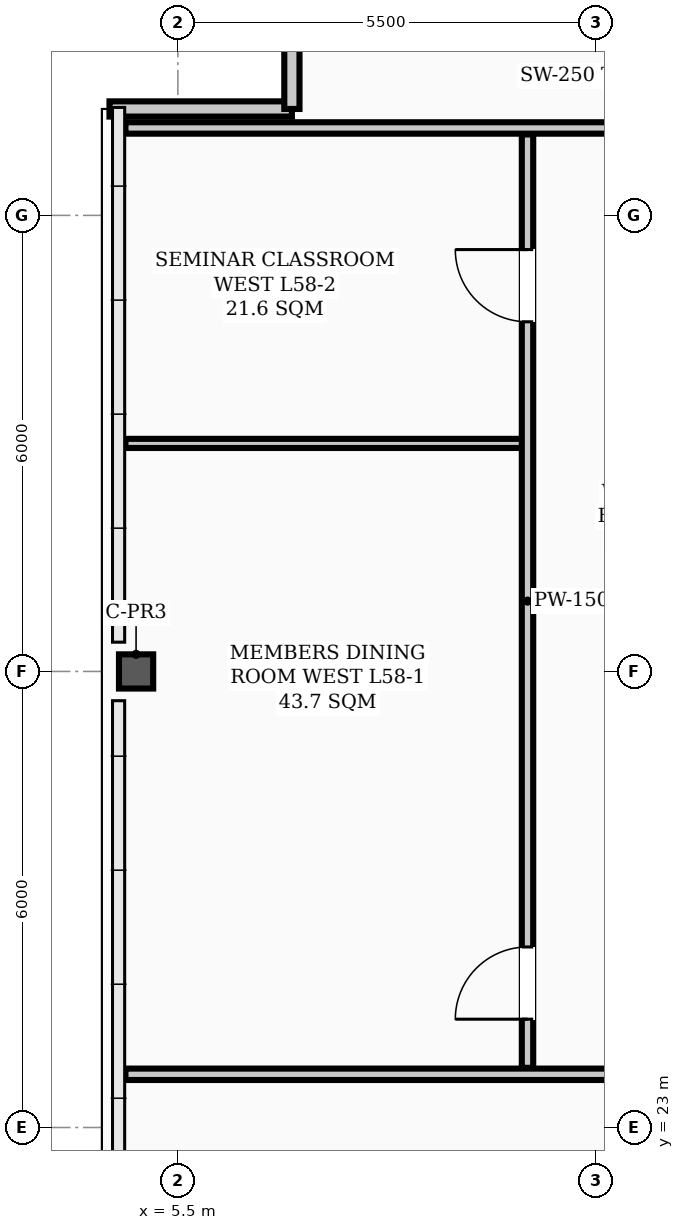
"""IFC4 building model, lengths in metres.
Left out: names, types, materials, properties, quantities, classifications, styles, units other than length and angle.
Written with IfcOpenShell. Run it as: python <this file> out.ifc"""

import sys

from ifc_helpers import new_model, si_unit, direction, frame, frame_2d, origin, origin_2d, place, context, subcontext, project, spatial, rectangle, hollow_rectangle, extrude, element, fill, save


model = new_model("IFC4")
c1 = context("Model", 3, precision=1e-05, world=origin(), true_north=direction((0.0, 1.0)))
c2 = subcontext(c1, "Body", "Model", "MODEL_VIEW")
j1 = project(units=[si_unit("LENGTHUNIT", "METRE"), si_unit("PLANEANGLEUNIT", "RADIAN")], contexts=[c1])
p1 = place(None, origin())
s1 = spatial("IfcSite", under=j1, at=p1, CompositionType="ELEMENT")
p2 = place(p1, origin())
s2 = spatial("IfcBuilding", under=s1, at=p2, CompositionType="ELEMENT")
p3 = place(p2, frame((0.0, 0.0, 234.5)))
s3 = spatial("IfcBuildingStorey", under=s2, at=p3, CompositionType="ELEMENT", Elevation=234.5)
p4 = place(p3, frame((4.95, 29.0, 0.0), z_axis=(0.0, 0.0, 1.0), x_axis=(1.0, 0.0, 0.0)))
e1 = element("IfcColumn", 1, at=p4, inside=s3, PredefinedType="COLUMN", context=c2, shape_type="SweptSolid", body=[
    extrude(hollow_rectangle(XDim=0.45, YDim=0.45, WallThickness=0.022, InnerFilletRadius=0.022, OuterFilletRadius=0.044, at=origin_2d()), origin(), (0.0, 0.0, 1.0), 3.9),
])
p5 = place(p3, frame((4.6, 36.4, 0.0), z_axis=(0.0, 0.0, 1.0), x_axis=(1.0, 0.0, 0.0)))
e2 = element("IfcWall", 2, at=p5, inside=s3, PredefinedType="PARAPET", context=c2, shape_type="SweptSolid", body=[
    extrude(rectangle(XDim=2.4, YDim=0.2, at=frame_2d((1.2, 0.0))), origin(), (0.0, 0.0, 1.0), 1.2),
])
p6 = place(p3, frame((7.0, 36.4, 0.0), z_axis=(0.0, 0.0, 1.0), x_axis=(0.0, 1.0, 0.0)))
e3 = element("IfcWall", 3, at=p6, inside=s3, PredefinedType="PARAPET", context=c2, shape_type="SweptSolid", body=[
    extrude(rectangle(XDim=2.4, YDim=0.2, at=frame_2d((1.2, 0.0))), origin(), (0.0, 0.0, 1.0), 1.2),
])
p7 = place(p3, frame((4.81, 23.7, 0.0), z_axis=(0.0, 0.0, 1.0), x_axis=(1.0, 0.0, 0.0)))
e4 = element("IfcWall", 4, at=p7, inside=s3, PredefinedType="PARTITIONING", context=c2, shape_type="SweptSolid", body=[
    extrude(rectangle(XDim=40.88, YDim=0.15, at=frame_2d((20.44, 0.0))), origin(), (0.0, 0.0, 1.0), 3.2),
])
p8 = place(p7, frame((6.665, 0.0, 0.0)))
e5 = element("IfcOpeningElement", 5, at=p8, cuts=e4, PredefinedType="OPENING", context=c2, shape_type="SweptSolid", body=[
    extrude(rectangle(XDim=0.95, YDim=2.08, at=frame_2d((0.475, 1.04))), frame((0.0, 0.085, 0.0), z_axis=(0.0, -1.0, 0.0), x_axis=(1.0, 0.0, 0.0)), (0.0, 0.0, 1.0), 0.17),
])
p9 = place(p7, frame((14.515, 0.0, 0.0)))
e6 = element("IfcOpeningElement", 6, at=p9, cuts=e4, PredefinedType="OPENING", context=c2, shape_type="SweptSolid", body=[
    extrude(rectangle(XDim=0.95, YDim=2.08, at=frame_2d((0.475, 1.04))), frame((0.0, 0.085, 0.0), z_axis=(0.0, -1.0, 0.0), x_axis=(1.0, 0.0, 0.0)), (0.0, 0.0, 1.0), 0.17),
])
p10 = place(p7, frame((23.115, 0.0, 0.0)))
e7 = element("IfcOpeningElement", 7, at=p10, cuts=e4, PredefinedType="OPENING", context=c2, shape_type="SweptSolid", body=[
    extrude(rectangle(XDim=0.95, YDim=2.08, at=frame_2d((0.475, 1.04))), frame((0.0, 0.085, 0.0), z_axis=(0.0, -1.0, 0.0), x_axis=(1.0, 0.0, 0.0)), (0.0, 0.0, 1.0), 0.17),
])
p11 = place(p7, frame((28.565, 0.0, 0.0)))
e8 = element("IfcOpeningElement", 8, at=p11, cuts=e4, PredefinedType="OPENING", context=c2, shape_type="SweptSolid", body=[
    extrude(rectangle(XDim=0.95, YDim=2.08, at=frame_2d((0.475, 1.04))), frame((0.0, 0.085, 0.0), z_axis=(0.0, -1.0, 0.0), x_axis=(1.0, 0.0, 0.0)), (0.0, 0.0, 1.0), 0.17),
])
p12 = place(p7, frame((36.965, 0.0, 0.0)))
e9 = element("IfcOpeningElement", 9, at=p12, cuts=e4, PredefinedType="OPENING", context=c2, shape_type="SweptSolid", body=[
    extrude(rectangle(XDim=0.95, YDim=2.08, at=frame_2d((0.475, 1.04))), frame((0.0, 0.085, 0.0), z_axis=(0.0, -1.0, 0.0), x_axis=(1.0, 0.0, 0.0)), (0.0, 0.0, 1.0), 0.17),
])
p13 = place(p3, frame((4.81, 36.15, 0.0), z_axis=(0.0, 0.0, 1.0), x_axis=(1.0, 0.0, 0.0)))
e10 = element("IfcWall", 10, at=p13, inside=s3, PredefinedType="PARTITIONING", context=c2, shape_type="SweptSolid", body=[
    extrude(rectangle(XDim=8.455, YDim=0.15, at=frame_2d((4.228, 0.0))), origin(), (0.0, 0.0, 1.0), 3.2),
])
p14 = place(p3, frame((4.81, 32.0, 0.0), z_axis=(0.0, 0.0, 1.0), x_axis=(1.0, 0.0, 0.0)))
e11 = element("IfcWall", 11, at=p14, inside=s3, PredefinedType="PARTITIONING", context=c2, shape_type="SweptSolid", body=[
    extrude(rectangle(XDim=5.29, YDim=0.12, at=frame_2d((2.645, 0.0))), origin(), (0.0, 0.0, 1.0), 3.72),
])
p15 = place(p3, frame((10.1, 23.785, 0.0), z_axis=(0.0, 0.0, 1.0), x_axis=(0.0, 1.0, 0.0)))
e12 = element("IfcWall", 12, at=p15, inside=s3, PredefinedType="PARTITIONING", context=c2, shape_type="SweptSolid", body=[
    extrude(rectangle(XDim=12.28, YDim=0.15, at=frame_2d((6.14, 0.0))), origin(), (0.0, 0.0, 1.0), 3.1),
])
p16 = place(p15, frame((0.64, 0.0, 0.0)))
e13 = element("IfcOpeningElement", 13, at=p16, cuts=e12, PredefinedType="OPENING", context=c2, shape_type="SweptSolid", body=[
    extrude(rectangle(XDim=0.95, YDim=2.08, at=frame_2d((0.475, 1.04))), frame((0.0, 0.085, 0.0), z_axis=(0.0, -1.0, 0.0), x_axis=(1.0, 0.0, 0.0)), (0.0, 0.0, 1.0), 0.17),
])
p17 = place(p15, frame((9.815, 0.0, 0.0)))
e14 = element("IfcOpeningElement", 14, at=p17, cuts=e12, PredefinedType="OPENING", context=c2, shape_type="SweptSolid", body=[
    extrude(rectangle(XDim=0.95, YDim=2.08, at=frame_2d((0.475, 1.04))), frame((0.0, 0.085, 0.0), z_axis=(0.0, -1.0, 0.0), x_axis=(1.0, 0.0, 0.0)), (0.0, 0.0, 1.0), 0.17),
])
p18 = place(p16, origin())
e15 = element("IfcDoor", 15, at=p18, inside=s3, OperationType="SINGLE_SWING_LEFT", PredefinedType="DOOR", context=c2, shape_type="SweptSolid", body=[
    extrude(rectangle(XDim=0.95, YDim=2.08, at=frame_2d((0.475, 1.04))), frame((0.0, 0.025, 0.0), z_axis=(0.0, -1.0, 0.0), x_axis=(1.0, 0.0, 0.0)), (0.0, 0.0, 1.0), 0.05),
])
fill(e13, e15)
p19 = place(p17, origin())
e16 = element("IfcDoor", 16, at=p19, inside=s3, OperationType="SINGLE_SWING_RIGHT", PredefinedType="DOOR", context=c2, shape_type="SweptSolid", body=[
    extrude(rectangle(XDim=0.95, YDim=2.08, at=frame_2d((0.475, 1.04))), frame((0.0, 0.025, 0.0), z_axis=(0.0, -1.0, 0.0), x_axis=(1.0, 0.0, 0.0)), (0.0, 0.0, 1.0), 0.05),
])
fill(e14, e16)
save(model, sys.argv[1])
